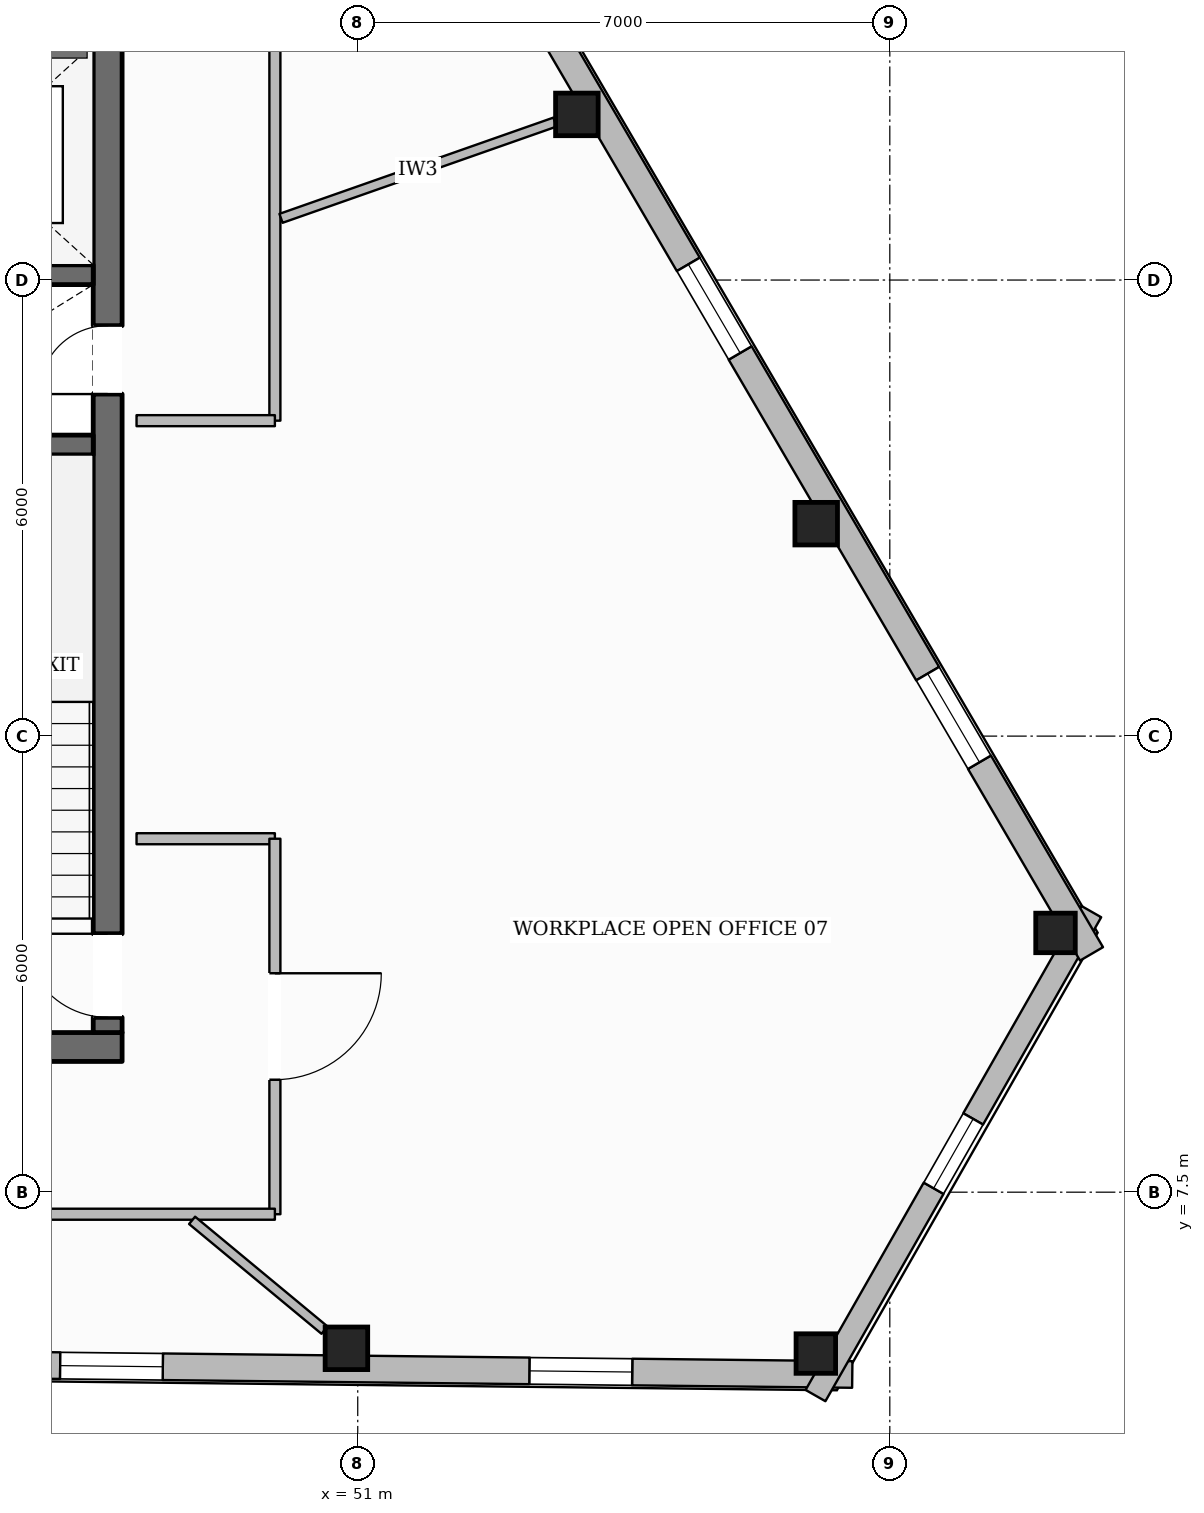
"""IFC4 building model, lengths in metres.
Left out: names, types, materials, properties, quantities, classifications, styles, units other than length and angle.
Written with IfcOpenShell. Run it as: python <this file> out.ifc"""

import sys

from ifc_helpers import new_model, si_unit, direction, frame, frame_2d, origin, origin_2d, place, context, subcontext, project, spatial, rectangle, hollow_rectangle, extrude, element, fill, save


model = new_model("IFC4")
c1 = context("Model", 3, precision=1e-05, world=origin(), true_north=direction((0.0, 1.0)))
c2 = subcontext(c1, "Body", "Model", "MODEL_VIEW")
j1 = project(units=[si_unit("LENGTHUNIT", "METRE"), si_unit("PLANEANGLEUNIT", "RADIAN")], contexts=[c1])
p1 = place(None, origin())
s1 = spatial("IfcSite", under=j1, at=p1, CompositionType="ELEMENT")
p2 = place(p1, origin())
s2 = spatial("IfcBuilding", under=s1, at=p2, CompositionType="ELEMENT")
p3 = place(p2, frame((0.0, 0.0, 251.05)))
s3 = spatial("IfcBuildingStorey", under=s2, at=p3, CompositionType="ELEMENT", Elevation=251.05)
p4 = place(p3, frame((28.1, 9.41, 0.0), z_axis=(0.0, 0.0, 1.0), x_axis=(1.0, 0.0, 0.0)))
e1 = element("IfcWall", 1, at=p4, inside=s3, PredefinedType="SOLIDWALL", context=c2, shape_type="SweptSolid", body=[
    extrude(rectangle(XDim=19.8, YDim=0.38, at=frame_2d((9.9, 0.0))), origin(), (0.0, 0.0, 1.0), 3.61),
])
p5 = place(p4, frame((10.4, 0.0, 0.0)))
e2 = element("IfcOpeningElement", 2, at=p5, cuts=e1, PredefinedType="OPENING", context=c2, shape_type="SweptSolid", body=[
    extrude(rectangle(XDim=1.4, YDim=2.2, at=frame_2d((0.7, 1.1))), frame((0.0, 0.2, 0.0), z_axis=(0.0, -1.0, 0.0), x_axis=(1.0, 0.0, 0.0)), (0.0, 0.0, 1.0), 0.4),
])
p6 = place(p3, frame((47.71, 9.6, 0.0), z_axis=(0.0, 0.0, 1.0), x_axis=(0.0, 1.0, 0.0)))
e3 = element("IfcWall", 3, at=p6, inside=s3, PredefinedType="SOLIDWALL", context=c2, shape_type="SweptSolid", body=[
    extrude(rectangle(XDim=13.0, YDim=0.38, at=frame_2d((6.5, 0.0))), origin(), (0.0, 0.0, 1.0), 3.61),
])
p7 = place(p6, frame((0.2, 0.0, 0.0)))
e4 = element("IfcOpeningElement", 4, at=p7, cuts=e3, PredefinedType="OPENING", context=c2, shape_type="SweptSolid", body=[
    extrude(rectangle(XDim=1.1, YDim=2.15, at=frame_2d((0.55, 1.075))), frame((0.0, 0.2, 0.0), z_axis=(0.0, -1.0, 0.0), x_axis=(1.0, 0.0, 0.0)), (0.0, 0.0, 1.0), 0.4),
])
p8 = place(p6, frame((8.4, 0.0, 0.0)))
e5 = element("IfcOpeningElement", 5, at=p8, cuts=e3, PredefinedType="OPENING", context=c2, shape_type="SweptSolid", body=[
    extrude(rectangle(XDim=0.9, YDim=2.1, at=frame_2d((0.45, 1.05))), frame((0.0, 0.2, 0.0), z_axis=(0.0, -1.0, 0.0), x_axis=(1.0, 0.0, 0.0)), (0.0, 0.0, 1.0), 0.4),
])
for number, where, z_axis, x_axis in (
    (6, (44.32, 17.33, 0.0), (0.0, 0.0, 1.0), (1.0, 0.0, 0.0)),
    (7, (44.32, 19.57, 0.0), (0.0, 0.0, 1.0), (1.0, 0.0, 0.0)),
):
    element("IfcWall", number, at=place(p3, frame(where, z_axis=z_axis, x_axis=x_axis)), inside=s3, PredefinedType="SHEAR", context=c2, shape_type="SweptSolid", body=[
        extrude(rectangle(XDim=3.2, YDim=0.26, at=frame_2d((1.6, 0.0))), origin(), (0.0, 0.0, 1.0), 3.61),
    ])
p9 = place(p3, frame((50.851, 5.446, 0.0), z_axis=(0.0, 0.0, 1.0), x_axis=(1.0, 0.0, 0.0)))
e8 = element("IfcColumn", 8, at=p9, inside=s3, PredefinedType="COLUMN", context=c2, shape_type="SweptSolid", body=[
    extrude(hollow_rectangle(XDim=0.56, YDim=0.56, WallThickness=0.025, at=origin_2d()), origin(), (0.0, 0.0, 1.0), 3.61),
])
for number, where, z_axis, x_axis in (
    (9, (57.027, 5.377, 0.0), (0.0, 0.0, 1.0), (1.0, 0.0, 0.0)),
    (10, (60.18, 10.911, 0.0), (0.0, 0.0, 1.0), (1.0, 0.0, 0.0)),
):
    element("IfcColumn", number, at=place(p3, frame(where, z_axis=z_axis, x_axis=x_axis)), inside=s3, PredefinedType="COLUMN", context=c2, shape_type="SweptSolid", body=[
        extrude(hollow_rectangle(XDim=0.52, YDim=0.52, WallThickness=0.024, at=origin_2d()), origin(), (0.0, 0.0, 1.0), 3.61),
    ])
for number, where, z_axis, x_axis in (
    (11, (57.031, 16.295, 0.0), (0.0, 0.0, 1.0), (1.0, 0.0, 0.0)),
    (12, (53.883, 21.679, 0.0), (0.0, 0.0, 1.0), (1.0, 0.0, 0.0)),
):
    element("IfcColumn", number, at=place(p3, frame(where, z_axis=z_axis, x_axis=x_axis)), inside=s3, PredefinedType="COLUMN", context=c2, shape_type="SweptSolid", body=[
        extrude(hollow_rectangle(XDim=0.56, YDim=0.56, WallThickness=0.025, at=origin_2d()), origin(), (0.0, 0.0, 1.0), 3.61),
    ])
p10 = place(p3, frame((57.506, 5.102, 0.0), z_axis=(0.0, 0.0, 1.0), x_axis=(-0.999937327785, 0.011195557226, 0.0)))
e13 = element("IfcWall", 13, at=p10, inside=s3, PredefinedType="STANDARD", context=c2, shape_type="SweptSolid", body=[
    extrude(rectangle(XDim=38.01, YDim=0.35, at=frame_2d((19.005, 0.0))), origin(), (0.0, 0.0, 1.0), 3.196),
])
p11 = place(p10, frame((33.775, 0.0, 0.65)))
e14 = element("IfcOpeningElement", 14, at=p11, cuts=e13, PredefinedType="OPENING", context=c2, shape_type="SweptSolid", body=[
    extrude(rectangle(XDim=1.35, YDim=1.75, at=frame_2d((0.675, 0.875))), frame((0.0, 0.185, 0.0), z_axis=(0.0, -1.0, 0.0), x_axis=(1.0, 0.0, 0.0)), (0.0, 0.0, 1.0), 0.37),
])
p12 = place(p10, frame((27.599, 0.0, 0.65)))
e15 = element("IfcOpeningElement", 15, at=p12, cuts=e13, PredefinedType="OPENING", context=c2, shape_type="SweptSolid", body=[
    extrude(rectangle(XDim=1.35, YDim=1.75, at=frame_2d((0.675, 0.875))), frame((0.0, 0.185, 0.0), z_axis=(0.0, -1.0, 0.0), x_axis=(1.0, 0.0, 0.0)), (0.0, 0.0, 1.0), 0.37),
])
p13 = place(p10, frame((15.247, 0.0, 0.65)))
e16 = element("IfcOpeningElement", 16, at=p13, cuts=e13, PredefinedType="OPENING", context=c2, shape_type="SweptSolid", body=[
    extrude(rectangle(XDim=1.35, YDim=1.75, at=frame_2d((0.675, 0.875))), frame((0.0, 0.185, 0.0), z_axis=(0.0, -1.0, 0.0), x_axis=(1.0, 0.0, 0.0)), (0.0, 0.0, 1.0), 0.37),
])
p14 = place(p10, frame((9.071, 0.0, 0.65)))
e17 = element("IfcOpeningElement", 17, at=p14, cuts=e13, PredefinedType="OPENING", context=c2, shape_type="SweptSolid", body=[
    extrude(rectangle(XDim=1.35, YDim=1.75, at=frame_2d((0.675, 0.875))), frame((0.0, 0.185, 0.0), z_axis=(0.0, -1.0, 0.0), x_axis=(1.0, 0.0, 0.0)), (0.0, 0.0, 1.0), 0.37),
])
p15 = place(p10, frame((2.896, 0.0, 0.65)))
e18 = element("IfcOpeningElement", 18, at=p15, cuts=e13, PredefinedType="OPENING", context=c2, shape_type="SweptSolid", body=[
    extrude(rectangle(XDim=1.35, YDim=1.75, at=frame_2d((0.675, 0.875))), frame((0.0, 0.185, 0.0), z_axis=(0.0, -1.0, 0.0), x_axis=(1.0, 0.0, 0.0)), (0.0, 0.0, 1.0), 0.37),
])
p16 = place(p3, frame((60.651, 11.191, 0.0), z_axis=(0.0, 0.0, 1.0), x_axis=(-0.495112521008, -0.868828862056, 0.0)))
e19 = element("IfcWall", 19, at=p16, inside=s3, PredefinedType="STANDARD", context=c2, shape_type="SweptSolid", body=[
    extrude(rectangle(XDim=7.328, YDim=0.3, at=frame_2d((3.664, 0.0))), origin(), (0.0, 0.0, 1.0), 3.196),
])
p17 = place(p16, frame((3.139, 0.0, 0.65)))
e20 = element("IfcOpeningElement", 20, at=p17, cuts=e19, PredefinedType="OPENING", context=c2, shape_type="SweptSolid", body=[
    extrude(rectangle(XDim=1.05, YDim=1.7, at=frame_2d((0.525, 0.85))), frame((0.0, 0.16, 0.0), z_axis=(0.0, -1.0, 0.0), x_axis=(1.0, 0.0, 0.0)), (0.0, 0.0, 1.0), 0.32),
])
p18 = place(p3, frame((41.284, 43.76, 0.0), z_axis=(0.0, 0.0, 1.0), x_axis=(0.50479404613, -0.863239810824, 0.0)))
e21 = element("IfcWall", 21, at=p18, inside=s3, PredefinedType="STANDARD", context=c2, shape_type="SweptSolid", body=[
    extrude(rectangle(XDim=38.372, YDim=0.35, at=frame_2d((19.186, 0.0))), origin(), (0.0, 0.0, 1.0), 3.196),
])
p19 = place(p18, frame((34.102, 0.0, 0.65)))
e22 = element("IfcOpeningElement", 22, at=p19, cuts=e21, PredefinedType="OPENING", context=c2, shape_type="SweptSolid", body=[
    extrude(rectangle(XDim=1.35, YDim=1.75, at=frame_2d((0.675, 0.875))), frame((0.0, 0.185, 0.0), z_axis=(0.0, -1.0, 0.0), x_axis=(1.0, 0.0, 0.0)), (0.0, 0.0, 1.0), 0.37),
])
p20 = place(p18, frame((27.864, 0.0, 0.65)))
e23 = element("IfcOpeningElement", 23, at=p20, cuts=e21, PredefinedType="OPENING", context=c2, shape_type="SweptSolid", body=[
    extrude(rectangle(XDim=1.35, YDim=1.75, at=frame_2d((0.675, 0.875))), frame((0.0, 0.185, 0.0), z_axis=(0.0, -1.0, 0.0), x_axis=(1.0, 0.0, 0.0)), (0.0, 0.0, 1.0), 0.37),
])
p21 = place(p18, frame((15.39, 0.0, 0.65)))
e24 = element("IfcOpeningElement", 24, at=p21, cuts=e21, PredefinedType="OPENING", context=c2, shape_type="SweptSolid", body=[
    extrude(rectangle(XDim=1.35, YDim=1.75, at=frame_2d((0.675, 0.875))), frame((0.0, 0.185, 0.0), z_axis=(0.0, -1.0, 0.0), x_axis=(1.0, 0.0, 0.0)), (0.0, 0.0, 1.0), 0.37),
])
p22 = place(p18, frame((9.153, 0.0, 0.65)))
e25 = element("IfcOpeningElement", 25, at=p22, cuts=e21, PredefinedType="OPENING", context=c2, shape_type="SweptSolid", body=[
    extrude(rectangle(XDim=1.35, YDim=1.75, at=frame_2d((0.675, 0.875))), frame((0.0, 0.185, 0.0), z_axis=(0.0, -1.0, 0.0), x_axis=(1.0, 0.0, 0.0)), (0.0, 0.0, 1.0), 0.37),
])
p23 = place(p18, frame((2.915, 0.0, 0.65)))
e26 = element("IfcOpeningElement", 26, at=p23, cuts=e21, PredefinedType="OPENING", context=c2, shape_type="SweptSolid", body=[
    extrude(rectangle(XDim=1.35, YDim=1.75, at=frame_2d((0.675, 0.875))), frame((0.0, 0.185, 0.0), z_axis=(0.0, -1.0, 0.0), x_axis=(1.0, 0.0, 0.0)), (0.0, 0.0, 1.0), 0.37),
])
p24 = place(p3, frame((49.91, 24.99, 0.0), z_axis=(0.0, 0.0, 1.0), x_axis=(0.0, -1.0, 0.0)))
e27 = element("IfcWall", 27, at=p24, inside=s3, PredefinedType="PARTITIONING", context=c2, shape_type="SweptSolid", body=[
    extrude(rectangle(XDim=7.34, YDim=0.145, at=frame_2d((3.67, 0.0))), origin(), (0.0, 0.0, 1.0), 3.349),
])
for number, where, z_axis, x_axis in (
    (28, (49.91, 17.65, 0.0), (0.0, 0.0, 1.0), (-1.0, 0.0, 0.0)),
    (29, (48.09, 12.15, 0.0), (0.0, 0.0, 1.0), (1.0, 0.0, 0.0)),
):
    element("IfcWall", number, at=place(p3, frame(where, z_axis=z_axis, x_axis=x_axis)), inside=s3, PredefinedType="PARTITIONING", context=c2, shape_type="SweptSolid", body=[
        extrude(rectangle(XDim=1.82, YDim=0.145, at=frame_2d((0.91, 0.0))), origin(), (0.0, 0.0, 1.0), 3.61),
    ])
p25 = place(p3, frame((49.91, 12.15, 0.0), z_axis=(0.0, 0.0, 1.0), x_axis=(0.0, -1.0, 0.0)))
e30 = element("IfcWall", 30, at=p25, inside=s3, PredefinedType="PARTITIONING", context=c2, shape_type="SweptSolid", body=[
    extrude(rectangle(XDim=4.94, YDim=0.145, at=frame_2d((2.47, 0.0))), origin(), (0.0, 0.0, 1.0), 3.61),
])
p26 = place(p25, frame((1.77, 0.0, 0.0)))
e31 = element("IfcOpeningElement", 31, at=p26, cuts=e30, PredefinedType="OPENING", context=c2, shape_type="SweptSolid", body=[
    extrude(rectangle(XDim=1.4, YDim=2.2, at=frame_2d((0.7, 1.1))), frame((0.0, 0.083, 0.0), z_axis=(0.0, -1.0, 0.0), x_axis=(1.0, 0.0, 0.0)), (0.0, 0.0, 1.0), 0.165),
])
p27 = place(p3, frame((49.91, 7.21, 0.0), z_axis=(0.0, 0.0, 1.0), x_axis=(-1.0, 0.0, 0.0)))
e32 = element("IfcWall", 32, at=p27, inside=s3, PredefinedType="PARTITIONING", context=c2, shape_type="SweptSolid", body=[
    extrude(rectangle(XDim=23.82, YDim=0.145, at=frame_2d((11.91, 0.0))), origin(), (0.0, 0.0, 1.0), 3.61),
])
p28 = place(p27, frame((19.928, 0.0, 0.0)))
e33 = element("IfcOpeningElement", 33, at=p28, cuts=e32, PredefinedType="OPENING", context=c2, shape_type="SweptSolid", body=[
    extrude(rectangle(XDim=0.98, YDim=2.15, at=frame_2d((0.49, 1.075))), frame((0.0, 0.083, 0.0), z_axis=(0.0, -1.0, 0.0), x_axis=(1.0, 0.0, 0.0)), (0.0, 0.0, 1.0), 0.165),
])
p29 = place(p27, frame((8.487, 0.0, 0.0)))
e34 = element("IfcOpeningElement", 34, at=p29, cuts=e32, PredefinedType="OPENING", context=c2, shape_type="SweptSolid", body=[
    extrude(rectangle(XDim=0.98, YDim=2.15, at=frame_2d((0.49, 1.075))), frame((0.0, 0.083, 0.0), z_axis=(0.0, -1.0, 0.0), x_axis=(1.0, 0.0, 0.0)), (0.0, 0.0, 1.0), 0.165),
])
p30 = place(p3, frame((49.99, 20.312, 0.0), z_axis=(0.0, 0.0, 1.0), x_axis=(0.943507124712, 0.331352237986, 0.0)))
e35 = element("IfcWall", 35, at=p30, inside=s3, PredefinedType="PARTITIONING", context=c2, shape_type="SweptSolid", body=[
    extrude(rectangle(XDim=3.82, YDim=0.125, at=frame_2d((1.91, 0.0))), origin(), (0.0, 0.0, 1.0), 3.61),
])
p31 = place(p3, frame((48.821, 7.129, 0.0), z_axis=(0.0, 0.0, 1.0), x_axis=(0.769836810093, -0.63824077418, 0.0)))
e36 = element("IfcWall", 36, at=p31, inside=s3, PredefinedType="PARTITIONING", context=c2, shape_type="SweptSolid", body=[
    extrude(rectangle(XDim=2.263, YDim=0.125, at=frame_2d((1.132, 0.0))), origin(), (0.0, 0.0, 1.0), 3.246),
])
p32 = place(p14, origin())
e37 = element("IfcWindow", 37, at=p32, inside=s3, PartitioningType="SINGLE_PANEL", PredefinedType="WINDOW", context=c2, shape_type="SweptSolid", body=[
    extrude(rectangle(XDim=1.35, YDim=1.75, at=frame_2d((0.675, 0.875))), frame((0.0, 0.03, 0.0), z_axis=(0.0, -1.0, 0.0), x_axis=(1.0, 0.0, 0.0)), (0.0, 0.0, 1.0), 0.06),
])
fill(e17, e37)
p33 = place(p15, origin())
e38 = element("IfcWindow", 38, at=p33, inside=s3, PartitioningType="SINGLE_PANEL", PredefinedType="WINDOW", context=c2, shape_type="SweptSolid", body=[
    extrude(rectangle(XDim=1.35, YDim=1.75, at=frame_2d((0.675, 0.875))), frame((0.0, 0.03, 0.0), z_axis=(0.0, -1.0, 0.0), x_axis=(1.0, 0.0, 0.0)), (0.0, 0.0, 1.0), 0.06),
])
fill(e18, e38)
p34 = place(p19, origin())
e39 = element("IfcWindow", 39, at=p34, inside=s3, PartitioningType="SINGLE_PANEL", PredefinedType="WINDOW", context=c2, shape_type="SweptSolid", body=[
    extrude(rectangle(XDim=1.35, YDim=1.75, at=frame_2d((0.675, 0.875))), frame((0.0, 0.03, 0.0), z_axis=(0.0, -1.0, 0.0), x_axis=(1.0, 0.0, 0.0)), (0.0, 0.0, 1.0), 0.06),
])
fill(e22, e39)
p35 = place(p20, origin())
e40 = element("IfcWindow", 40, at=p35, inside=s3, PartitioningType="SINGLE_PANEL", PredefinedType="WINDOW", context=c2, shape_type="SweptSolid", body=[
    extrude(rectangle(XDim=1.35, YDim=1.75, at=frame_2d((0.675, 0.875))), frame((0.0, 0.03, 0.0), z_axis=(0.0, -1.0, 0.0), x_axis=(1.0, 0.0, 0.0)), (0.0, 0.0, 1.0), 0.06),
])
fill(e23, e40)
p36 = place(p17, origin())
e41 = element("IfcWindow", 41, at=p36, inside=s3, PartitioningType="SINGLE_PANEL", PredefinedType="WINDOW", context=c2, shape_type="SweptSolid", body=[
    extrude(rectangle(XDim=1.05, YDim=1.7, at=frame_2d((0.525, 0.85))), frame((0.0, 0.03, 0.0), z_axis=(0.0, -1.0, 0.0), x_axis=(1.0, 0.0, 0.0)), (0.0, 0.0, 1.0), 0.06),
])
fill(e20, e41)
p37 = place(p7, origin())
e42 = element("IfcDoor", 42, at=p37, inside=s3, OperationType="SINGLE_SWING_RIGHT", PredefinedType="DOOR", context=c2, shape_type="SweptSolid", body=[
    extrude(rectangle(XDim=1.1, YDim=2.15, at=frame_2d((0.55, 1.075))), frame((0.0, 0.025, 0.0), z_axis=(0.0, -1.0, 0.0), x_axis=(1.0, 0.0, 0.0)), (0.0, 0.0, 1.0), 0.05),
])
fill(e4, e42)
p38 = place(p8, origin())
e43 = element("IfcDoor", 43, at=p38, inside=s3, OperationType="SINGLE_SWING_LEFT", PredefinedType="DOOR", context=c2, shape_type="SweptSolid", body=[
    extrude(rectangle(XDim=0.9, YDim=2.1, at=frame_2d((0.45, 1.05))), frame((0.0, 0.025, 0.0), z_axis=(0.0, -1.0, 0.0), x_axis=(1.0, 0.0, 0.0)), (0.0, 0.0, 1.0), 0.05),
])
fill(e5, e43)
p39 = place(p26, origin())
e44 = element("IfcDoor", 44, at=p39, inside=s3, OperationType="SINGLE_SWING_LEFT", PredefinedType="DOOR", context=c2, shape_type="SweptSolid", body=[
    extrude(rectangle(XDim=1.4, YDim=2.2, at=frame_2d((0.7, 1.1))), frame((0.0, 0.025, 0.0), z_axis=(0.0, -1.0, 0.0), x_axis=(1.0, 0.0, 0.0)), (0.0, 0.0, 1.0), 0.05),
])
fill(e31, e44)
save(model, sys.argv[1])
